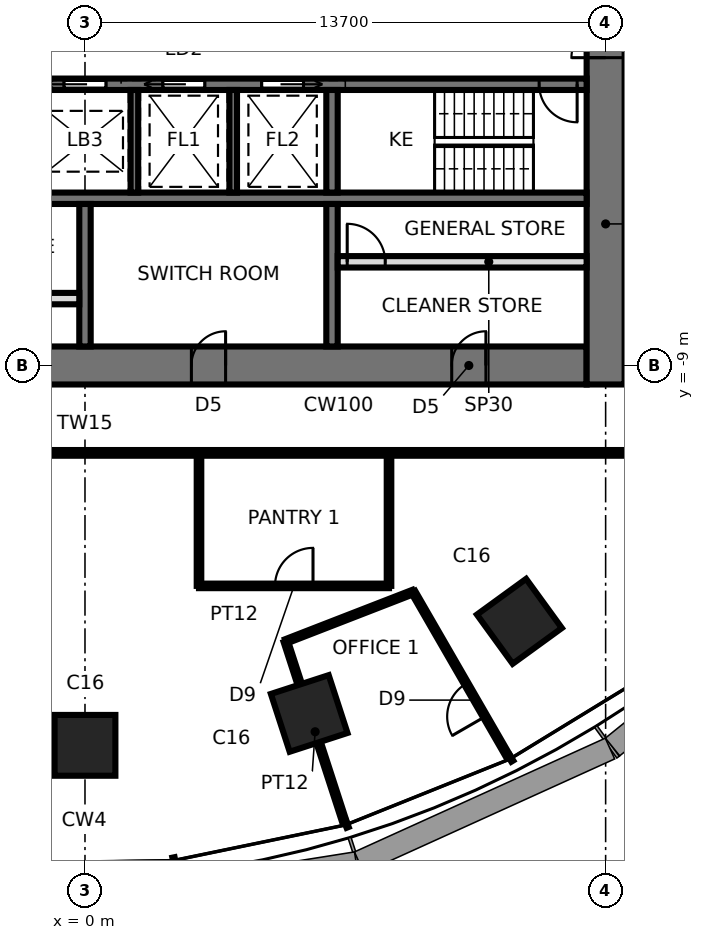
"""IFC4 building model, lengths in metres.
Left out: names, types, materials, properties, quantities, classifications, styles, units other than length and angle.
Written with IfcOpenShell. Run it as: python <this file> out.ifc"""

import sys

from ifc_helpers import new_model, si_unit, direction, frame, frame_2d, origin, origin_2d, place, context, subcontext, project, spatial, rectangle, extrude, element, fill, save


model = new_model("IFC4")
c1 = context("Model", 3, precision=1e-05, world=origin(), true_north=direction((0.0, 1.0)))
c2 = subcontext(c1, "Body", "Model", "MODEL_VIEW")
j1 = project(units=[si_unit("LENGTHUNIT", "METRE"), si_unit("PLANEANGLEUNIT", "RADIAN")], contexts=[c1])
p1 = place(None, origin())
s1 = spatial("IfcSite", under=j1, at=p1, CompositionType="ELEMENT")
p2 = place(p1, origin())
s2 = spatial("IfcBuilding", under=s1, at=p2, CompositionType="ELEMENT")
p3 = place(p2, frame((0.0, 0.0, 108.0)))
s3 = spatial("IfcBuildingStorey", under=s2, at=p3, CompositionType="ELEMENT", Elevation=108.0)
for number, where, z_axis, x_axis in (
    (1, (0.0, -18.996, 0.0), (0.0, 0.0, 1.0), (0.0, -1.0, 0.0)),
    (2, (5.9, -18.157, 0.0), (0.0, 0.0, 1.0), (0.309, -0.951, 0.0)),
    (3, (11.43, -15.733, 0.0), (0.0, 0.0, 1.0), (0.588, -0.809, 0.0)),
):
    element("IfcColumn", number, at=place(p3, frame(where, z_axis=z_axis, x_axis=x_axis)), inside=s3, PredefinedType="COLUMN", context=c2, shape_type="SweptSolid", body=[
        extrude(rectangle(XDim=1.6, YDim=1.6, at=origin_2d()), origin(), (0.0, 0.0, 1.0), 3.9),
    ])
p4 = place(p3, frame((-13.2, -9.0, 0.0), z_axis=(0.0, 0.0, 1.0), x_axis=(1.0, 0.0, 0.0)))
e4 = element("IfcWall", 4, at=p4, inside=s3, PredefinedType="SHEAR", context=c2, shape_type="SweptSolid", body=[
    extrude(rectangle(XDim=26.4, YDim=1.0, at=frame_2d((13.2, 0.0))), origin(), (0.0, 0.0, 1.0), 3.9),
])
p5 = place(p4, frame((2.65, 0.0, 0.0)))
e5 = element("IfcOpeningElement", 5, at=p5, cuts=e4, PredefinedType="OPENING", context=c2, shape_type="SweptSolid", body=[
    extrude(rectangle(XDim=0.9, YDim=2.1, at=frame_2d((0.45, 1.05))), frame((0.0, 0.51, 0.0), z_axis=(0.0, -1.0, 0.0), x_axis=(1.0, 0.0, 0.0)), (0.0, 0.0, 1.0), 1.02),
])
p6 = place(p4, frame((9.5, 0.0, 0.0)))
e6 = element("IfcOpeningElement", 6, at=p6, cuts=e4, PredefinedType="OPENING", context=c2, shape_type="SweptSolid", body=[
    extrude(rectangle(XDim=0.9, YDim=2.1, at=frame_2d((0.45, 1.05))), frame((0.0, 0.51, 0.0), z_axis=(0.0, -1.0, 0.0), x_axis=(1.0, 0.0, 0.0)), (0.0, 0.0, 1.0), 1.02),
])
p7 = place(p4, frame((16.0, 0.0, 0.0)))
e7 = element("IfcOpeningElement", 7, at=p7, cuts=e4, PredefinedType="OPENING", context=c2, shape_type="SweptSolid", body=[
    extrude(rectangle(XDim=0.9, YDim=2.1, at=frame_2d((0.45, 1.05))), frame((0.0, 0.51, 0.0), z_axis=(0.0, -1.0, 0.0), x_axis=(1.0, 0.0, 0.0)), (0.0, 0.0, 1.0), 1.02),
])
p8 = place(p4, frame((22.85, 0.0, 0.0)))
e8 = element("IfcOpeningElement", 8, at=p8, cuts=e4, PredefinedType="OPENING", context=c2, shape_type="SweptSolid", body=[
    extrude(rectangle(XDim=0.9, YDim=2.1, at=frame_2d((0.45, 1.05))), frame((0.0, 0.51, 0.0), z_axis=(0.0, -1.0, 0.0), x_axis=(1.0, 0.0, 0.0)), (0.0, 0.0, 1.0), 1.02),
])
p9 = place(p3, frame((13.7, -9.5, 0.0), z_axis=(0.0, 0.0, 1.0), x_axis=(0.0, 1.0, 0.0)))
e9 = element("IfcWall", 9, at=p9, inside=s3, PredefinedType="SHEAR", context=c2, shape_type="SweptSolid", body=[
    extrude(rectangle(XDim=19.0, YDim=1.0, at=frame_2d((9.5, 0.0))), origin(), (0.0, 0.0, 1.0), 3.9),
])
p10 = place(p9, frame((8.6, 0.0, 0.0)))
e10 = element("IfcOpeningElement", 10, at=p10, cuts=e9, PredefinedType="OPENING", context=c2, shape_type="SweptSolid", body=[
    extrude(rectangle(XDim=1.8, YDim=2.4, at=frame_2d((0.9, 1.2))), frame((0.0, 0.51, 0.0), z_axis=(0.0, -1.0, 0.0), x_axis=(1.0, 0.0, 0.0)), (0.0, 0.0, 1.0), 1.02),
])
p11 = place(p3, frame((-13.2, -1.6, 0.0), z_axis=(0.0, 0.0, 1.0), x_axis=(1.0, 0.0, 0.0)))
e11 = element("IfcWall", 11, at=p11, inside=s3, PredefinedType="SHEAR", context=c2, shape_type="SweptSolid", body=[
    extrude(rectangle(XDim=26.4, YDim=0.3, at=frame_2d((13.2, 0.0))), origin(), (0.0, 0.0, 1.0), 3.9),
])
p12 = place(p11, frame((25.15, 0.0, 0.0)))
e12 = element("IfcOpeningElement", 12, at=p12, cuts=e11, PredefinedType="OPENING", context=c2, shape_type="SweptSolid", body=[
    extrude(rectangle(XDim=1.0, YDim=2.1, at=frame_2d((0.5, 1.05))), frame((0.0, 0.16, 0.0), z_axis=(0.0, -1.0, 0.0), x_axis=(1.0, 0.0, 0.0)), (0.0, 0.0, 1.0), 0.32),
])
p13 = place(p11, frame((7.45, 0.0, 0.0)))
e13 = element("IfcOpeningElement", 13, at=p13, cuts=e11, PredefinedType="OPENING", context=c2, shape_type="SweptSolid", body=[
    extrude(rectangle(XDim=1.1, YDim=2.3, at=frame_2d((0.55, 1.15))), frame((0.0, 0.16, 0.0), z_axis=(0.0, -1.0, 0.0), x_axis=(1.0, 0.0, 0.0)), (0.0, 0.0, 1.0), 0.32),
])
p14 = place(p11, frame((10.05, 0.0, 0.0)))
e14 = element("IfcOpeningElement", 14, at=p14, cuts=e11, PredefinedType="OPENING", context=c2, shape_type="SweptSolid", body=[
    extrude(rectangle(XDim=1.1, YDim=2.3, at=frame_2d((0.55, 1.15))), frame((0.0, 0.16, 0.0), z_axis=(0.0, -1.0, 0.0), x_axis=(1.0, 0.0, 0.0)), (0.0, 0.0, 1.0), 0.32),
])
p15 = place(p11, frame((12.65, 0.0, 0.0)))
e15 = element("IfcOpeningElement", 15, at=p15, cuts=e11, PredefinedType="OPENING", context=c2, shape_type="SweptSolid", body=[
    extrude(rectangle(XDim=1.1, YDim=2.3, at=frame_2d((0.55, 1.15))), frame((0.0, 0.16, 0.0), z_axis=(0.0, -1.0, 0.0), x_axis=(1.0, 0.0, 0.0)), (0.0, 0.0, 1.0), 0.32),
])
p16 = place(p11, frame((15.25, 0.0, 0.0)))
e16 = element("IfcOpeningElement", 16, at=p16, cuts=e11, PredefinedType="OPENING", context=c2, shape_type="SweptSolid", body=[
    extrude(rectangle(XDim=1.1, YDim=2.3, at=frame_2d((0.55, 1.15))), frame((0.0, 0.16, 0.0), z_axis=(0.0, -1.0, 0.0), x_axis=(1.0, 0.0, 0.0)), (0.0, 0.0, 1.0), 0.32),
])
p17 = place(p11, frame((17.85, 0.0, 0.0)))
e17 = element("IfcOpeningElement", 17, at=p17, cuts=e11, PredefinedType="OPENING", context=c2, shape_type="SweptSolid", body=[
    extrude(rectangle(XDim=1.1, YDim=2.3, at=frame_2d((0.55, 1.15))), frame((0.0, 0.16, 0.0), z_axis=(0.0, -1.0, 0.0), x_axis=(1.0, 0.0, 0.0)), (0.0, 0.0, 1.0), 0.32),
])
p18 = place(p11, frame((5.55, 0.0, 0.0)))
e18 = element("IfcOpeningElement", 18, at=p18, cuts=e11, PredefinedType="OPENING", context=c2, shape_type="SweptSolid", body=[
    extrude(rectangle(XDim=0.9, YDim=2.1, at=frame_2d((0.45, 1.05))), frame((0.0, 0.16, 0.0), z_axis=(0.0, -1.0, 0.0), x_axis=(1.0, 0.0, 0.0)), (0.0, 0.0, 1.0), 0.32),
])
p19 = place(p3, frame((-13.2, -4.6, 0.0), z_axis=(0.0, 0.0, 1.0), x_axis=(1.0, 0.0, 0.0)))
e19 = element("IfcWall", 19, at=p19, inside=s3, PredefinedType="SHEAR", context=c2, shape_type="SweptSolid", body=[
    extrude(rectangle(XDim=26.4, YDim=0.3, at=frame_2d((13.2, 0.0))), origin(), (0.0, 0.0, 1.0), 3.9),
])
p20 = place(p3, frame((6.5, -1.75, 0.0), z_axis=(0.0, 0.0, 1.0), x_axis=(0.0, -1.0, 0.0)))
e20 = element("IfcWall", 20, at=p20, inside=s3, PredefinedType="SHEAR", context=c2, shape_type="SweptSolid", body=[
    extrude(rectangle(XDim=2.7, YDim=0.3, at=frame_2d((1.35, 0.0))), origin(), (0.0, 0.0, 1.0), 3.9),
])
p21 = place(p3, frame((6.5, -4.75, 0.0), z_axis=(0.0, 0.0, 1.0), x_axis=(0.0, -1.0, 0.0)))
e21 = element("IfcWall", 21, at=p21, inside=s3, PredefinedType="SHEAR", context=c2, shape_type="SweptSolid", body=[
    extrude(rectangle(XDim=3.75, YDim=0.3, at=frame_2d((1.875, 0.0))), origin(), (0.0, 0.0, 1.0), 3.9),
])
for number, where, z_axis, x_axis in (
    (22, (1.3, -1.75, 0.0), (0.0, 0.0, 1.0), (0.0, -1.0, 0.0)),
    (23, (3.9, -1.75, 0.0), (0.0, 0.0, 1.0), (0.0, -1.0, 0.0)),
):
    element("IfcWall", number, at=place(p3, frame(where, z_axis=z_axis, x_axis=x_axis)), inside=s3, PredefinedType="SHEAR", context=c2, shape_type="SweptSolid", body=[
        extrude(rectangle(XDim=2.7, YDim=0.2, at=frame_2d((1.35, 0.0))), origin(), (0.0, 0.0, 1.0), 3.9),
    ])
p22 = place(p3, frame((0.0, -4.75, 0.0), z_axis=(0.0, 0.0, 1.0), x_axis=(0.0, -1.0, 0.0)))
e24 = element("IfcWall", 24, at=p22, inside=s3, PredefinedType="SHEAR", context=c2, shape_type="SweptSolid", body=[
    extrude(rectangle(XDim=3.75, YDim=0.3, at=frame_2d((1.875, 0.0))), origin(), (0.0, 0.0, 1.0), 3.9),
])
p23 = place(p3, frame((-6.35, -7.24, 0.0), z_axis=(0.0, 0.0, 1.0), x_axis=(1.0, 0.0, 0.0)))
e25 = element("IfcWall", 25, at=p23, inside=s3, PredefinedType="PARTITIONING", context=c2, shape_type="SweptSolid", body=[
    extrude(rectangle(XDim=6.2, YDim=0.3, at=frame_2d((3.1, 0.0))), origin(), (0.0, 0.0, 1.0), 3.74),
])
p24 = place(p23, frame((0.25, 0.0, 0.0)))
e26 = element("IfcOpeningElement", 26, at=p24, cuts=e25, PredefinedType="OPENING", context=c2, shape_type="SweptSolid", body=[
    extrude(rectangle(XDim=1.0, YDim=2.4, at=frame_2d((0.5, 1.2))), frame((0.0, 0.16, 0.0), z_axis=(0.0, -1.0, 0.0), x_axis=(1.0, 0.0, 0.0)), (0.0, 0.0, 1.0), 0.32),
])
p25 = place(p3, frame((6.65, -6.272, 0.0), z_axis=(0.0, 0.0, 1.0), x_axis=(1.0, 0.0, 0.0)))
e27 = element("IfcWall", 27, at=p25, inside=s3, PredefinedType="PARTITIONING", context=c2, shape_type="SweptSolid", body=[
    extrude(rectangle(XDim=6.55, YDim=0.3, at=frame_2d((3.275, 0.0))), origin(), (0.0, 0.0, 1.0), 3.74),
])
p26 = place(p25, frame((0.25, 0.0, 0.0)))
e28 = element("IfcOpeningElement", 28, at=p26, cuts=e27, PredefinedType="OPENING", context=c2, shape_type="SweptSolid", body=[
    extrude(rectangle(XDim=1.0, YDim=2.4, at=frame_2d((0.5, 1.2))), frame((0.0, 0.16, 0.0), z_axis=(0.0, -1.0, 0.0), x_axis=(1.0, 0.0, 0.0)), (0.0, 0.0, 1.0), 0.32),
])
p27 = place(p3, frame((-16.0, -11.3, 0.0), z_axis=(0.0, 0.0, 1.0), x_axis=(1.0, 0.0, 0.0)))
e29 = element("IfcWall", 29, at=p27, inside=s3, PredefinedType="PARTITIONING", context=c2, shape_type="SweptSolid", body=[
    extrude(rectangle(XDim=32.0, YDim=0.15, at=frame_2d((16.0, 0.0))), origin(), (0.0, 0.0, 1.0), 3.74),
])
p28 = place(p3, frame((3.0, -11.3, 0.0), z_axis=(0.0, 0.0, 1.0), x_axis=(0.0, -1.0, 0.0)))
e30 = element("IfcWall", 30, at=p28, inside=s3, PredefinedType="PARTITIONING", context=c2, shape_type="SweptSolid", body=[
    extrude(rectangle(XDim=3.5, YDim=0.12, at=frame_2d((1.75, 0.0))), origin(), (0.0, 0.0, 1.0), 3.74),
])
p29 = place(p3, frame((5.283, -16.261, 0.0), z_axis=(0.0, 0.0, 1.0), x_axis=(0.309040803421, -0.951048779938, 0.0)))
e31 = element("IfcWall", 31, at=p29, inside=s3, PredefinedType="PARTITIONING", context=c2, shape_type="SweptSolid", body=[
    extrude(rectangle(XDim=5.0, YDim=0.12, at=frame_2d((2.5, 0.0))), origin(), (0.0, 0.0, 1.0), 2.94),
])
p30 = place(p3, frame((3.0, -14.8, 0.0), z_axis=(0.0, 0.0, 1.0), x_axis=(1.0, 0.0, 0.0)))
e32 = element("IfcWall", 32, at=p30, inside=s3, PredefinedType="PARTITIONING", context=c2, shape_type="SweptSolid", body=[
    extrude(rectangle(XDim=5.0, YDim=0.12, at=frame_2d((2.5, 0.0))), origin(), (0.0, 0.0, 1.0), 3.74),
])
p31 = place(p30, frame((2.0, 0.0, 0.0)))
e33 = element("IfcOpeningElement", 33, at=p31, cuts=e32, PredefinedType="OPENING", context=c2, shape_type="SweptSolid", body=[
    extrude(rectangle(XDim=1.0, YDim=2.4, at=frame_2d((0.5, 1.2))), frame((0.0, 0.07, 0.0), z_axis=(0.0, -1.0, 0.0), x_axis=(1.0, 0.0, 0.0)), (0.0, 0.0, 1.0), 0.14),
])
p32 = place(p3, frame((8.637, -14.959, 0.0), z_axis=(0.0, 0.0, 1.0), x_axis=(-0.932196869483, -0.361951649432, 0.0)))
e34 = element("IfcWall", 34, at=p32, inside=s3, PredefinedType="PARTITIONING", context=c2, shape_type="SweptSolid", body=[
    extrude(rectangle(XDim=3.597, YDim=0.12, at=frame_2d((1.799, 0.0))), origin(), (0.0, 0.0, 1.0), 3.74),
])
p33 = place(p3, frame((11.137, -19.289, 0.0), z_axis=(0.0, 0.0, 1.0), x_axis=(-0.499983091616, 0.866035165624, 0.0)))
e35 = element("IfcWall", 35, at=p33, inside=s3, PredefinedType="PARTITIONING", context=c2, shape_type="SweptSolid", body=[
    extrude(rectangle(XDim=5.0, YDim=0.12, at=frame_2d((2.5, 0.0))), origin(), (0.0, 0.0, 1.0), 3.74),
])
p34 = place(p33, frame((1.213, 0.0, 0.0)))
e36 = element("IfcOpeningElement", 36, at=p34, cuts=e35, PredefinedType="OPENING", context=c2, shape_type="SweptSolid", body=[
    extrude(rectangle(XDim=1.0, YDim=2.4, at=frame_2d((0.5, 1.2))), frame((0.0, 0.07, 0.0), z_axis=(0.0, -1.0, 0.0), x_axis=(1.0, 0.0, 0.0)), (0.0, 0.0, 1.0), 0.14),
])
p35 = place(p3, frame((8.0, -14.8, 0.0), z_axis=(0.0, 0.0, 1.0), x_axis=(0.0, 1.0, 0.0)))
e37 = element("IfcWall", 37, at=p35, inside=s3, PredefinedType="PARTITIONING", context=c2, shape_type="SweptSolid", body=[
    extrude(rectangle(XDim=3.5, YDim=0.12, at=frame_2d((1.75, 0.0))), origin(), (0.0, 0.0, 1.0), 3.74),
])
p36 = place(p10, origin())
e38 = element("IfcDoor", 38, at=p36, inside=s3, OperationType="DOUBLE_DOOR_SINGLE_SWING", PredefinedType="DOOR", context=c2, shape_type="SweptSolid", body=[
    extrude(rectangle(XDim=1.72, YDim=2.36, at=frame_2d((0.9, 1.18))), frame((0.0, 0.025, 0.0), z_axis=(0.0, -1.0, 0.0), x_axis=(1.0, 0.0, 0.0)), (0.0, 0.0, 1.0), 0.05),
    extrude(rectangle(XDim=0.04, YDim=2.4, at=frame_2d((0.02, 1.2))), frame((0.0, 0.25, 0.0), z_axis=(0.0, -1.0, 0.0), x_axis=(1.0, 0.0, 0.0)), (0.0, 0.0, 1.0), 0.5),
    extrude(rectangle(XDim=0.04, YDim=2.4, at=frame_2d((1.78, 1.2))), frame((0.0, 0.25, 0.0), z_axis=(0.0, -1.0, 0.0), x_axis=(1.0, 0.0, 0.0)), (0.0, 0.0, 1.0), 0.5),
    extrude(rectangle(XDim=1.72, YDim=0.04, at=frame_2d((0.9, 2.38))), frame((0.0, 0.25, 0.0), z_axis=(0.0, -1.0, 0.0), x_axis=(1.0, 0.0, 0.0)), (0.0, 0.0, 1.0), 0.5),
])
fill(e10, e38)
p37 = place(p12, frame((1.0, 0.0, 0.0), z_axis=(0.0, 0.0, 1.0), x_axis=(-1.0, 0.0, 0.0)))
e39 = element("IfcDoor", 39, at=p37, inside=s3, OperationType="SINGLE_SWING_LEFT", PredefinedType="DOOR", context=c2, shape_type="SweptSolid", body=[
    extrude(rectangle(XDim=1.0, YDim=2.1, at=frame_2d((0.5, 1.05))), frame((0.0, 0.025, 0.0), z_axis=(0.0, -1.0, 0.0), x_axis=(1.0, 0.0, 0.0)), (0.0, 0.0, 1.0), 0.05),
])
fill(e12, e39)
p38 = place(p15, frame((1.1, 0.0, 0.0), z_axis=(0.0, 0.0, 1.0), x_axis=(-1.0, 0.0, 0.0)))
e40 = element("IfcDoor", 40, at=p38, inside=s3, OperationType="SLIDING_TO_RIGHT", PredefinedType="DOOR", context=c2, shape_type="SweptSolid", body=[
    extrude(rectangle(XDim=1.1, YDim=2.3, at=frame_2d((0.55, 1.15))), frame((0.0, 0.025, 0.0), z_axis=(0.0, -1.0, 0.0), x_axis=(1.0, 0.0, 0.0)), (0.0, 0.0, 1.0), 0.05),
])
fill(e15, e40)
p39 = place(p16, frame((1.1, 0.0, 0.0), z_axis=(0.0, 0.0, 1.0), x_axis=(-1.0, 0.0, 0.0)))
e41 = element("IfcDoor", 41, at=p39, inside=s3, OperationType="SLIDING_TO_RIGHT", PredefinedType="DOOR", context=c2, shape_type="SweptSolid", body=[
    extrude(rectangle(XDim=1.1, YDim=2.3, at=frame_2d((0.55, 1.15))), frame((0.0, 0.025, 0.0), z_axis=(0.0, -1.0, 0.0), x_axis=(1.0, 0.0, 0.0)), (0.0, 0.0, 1.0), 0.05),
])
fill(e16, e41)
p40 = place(p17, frame((1.1, 0.0, 0.0), z_axis=(0.0, 0.0, 1.0), x_axis=(-1.0, 0.0, 0.0)))
e42 = element("IfcDoor", 42, at=p40, inside=s3, OperationType="SLIDING_TO_LEFT", PredefinedType="DOOR", context=c2, shape_type="SweptSolid", body=[
    extrude(rectangle(XDim=1.1, YDim=2.3, at=frame_2d((0.55, 1.15))), frame((0.0, 0.025, 0.0), z_axis=(0.0, -1.0, 0.0), x_axis=(1.0, 0.0, 0.0)), (0.0, 0.0, 1.0), 0.05),
])
fill(e17, e42)
p41 = place(p7, origin())
e43 = element("IfcDoor", 43, at=p41, inside=s3, OperationType="SINGLE_SWING_RIGHT", PredefinedType="DOOR", context=c2, shape_type="SweptSolid", body=[
    extrude(rectangle(XDim=0.82, YDim=2.06, at=frame_2d((0.45, 1.03))), frame((0.0, 0.025, 0.0), z_axis=(0.0, -1.0, 0.0), x_axis=(1.0, 0.0, 0.0)), (0.0, 0.0, 1.0), 0.05),
    extrude(rectangle(XDim=0.04, YDim=2.1, at=frame_2d((0.02, 1.05))), frame((0.0, 0.25, 0.0), z_axis=(0.0, -1.0, 0.0), x_axis=(1.0, 0.0, 0.0)), (0.0, 0.0, 1.0), 0.5),
    extrude(rectangle(XDim=0.04, YDim=2.1, at=frame_2d((0.88, 1.05))), frame((0.0, 0.25, 0.0), z_axis=(0.0, -1.0, 0.0), x_axis=(1.0, 0.0, 0.0)), (0.0, 0.0, 1.0), 0.5),
    extrude(rectangle(XDim=0.82, YDim=0.04, at=frame_2d((0.45, 2.08))), frame((0.0, 0.25, 0.0), z_axis=(0.0, -1.0, 0.0), x_axis=(1.0, 0.0, 0.0)), (0.0, 0.0, 1.0), 0.5),
])
fill(e7, e43)
p42 = place(p8, origin())
e44 = element("IfcDoor", 44, at=p42, inside=s3, OperationType="SINGLE_SWING_RIGHT", PredefinedType="DOOR", context=c2, shape_type="SweptSolid", body=[
    extrude(rectangle(XDim=0.82, YDim=2.06, at=frame_2d((0.45, 1.03))), frame((0.0, 0.025, 0.0), z_axis=(0.0, -1.0, 0.0), x_axis=(1.0, 0.0, 0.0)), (0.0, 0.0, 1.0), 0.05),
    extrude(rectangle(XDim=0.04, YDim=2.1, at=frame_2d((0.02, 1.05))), frame((0.0, 0.25, 0.0), z_axis=(0.0, -1.0, 0.0), x_axis=(1.0, 0.0, 0.0)), (0.0, 0.0, 1.0), 0.5),
    extrude(rectangle(XDim=0.04, YDim=2.1, at=frame_2d((0.88, 1.05))), frame((0.0, 0.25, 0.0), z_axis=(0.0, -1.0, 0.0), x_axis=(1.0, 0.0, 0.0)), (0.0, 0.0, 1.0), 0.5),
    extrude(rectangle(XDim=0.82, YDim=0.04, at=frame_2d((0.45, 2.08))), frame((0.0, 0.25, 0.0), z_axis=(0.0, -1.0, 0.0), x_axis=(1.0, 0.0, 0.0)), (0.0, 0.0, 1.0), 0.5),
])
fill(e8, e44)
p43 = place(p26, origin())
e45 = element("IfcDoor", 45, at=p43, inside=s3, OperationType="SINGLE_SWING_LEFT", PredefinedType="DOOR", context=c2, shape_type="SweptSolid", body=[
    extrude(rectangle(XDim=1.0, YDim=2.4, at=frame_2d((0.5, 1.2))), frame((0.0, 0.025, 0.0), z_axis=(0.0, -1.0, 0.0), x_axis=(1.0, 0.0, 0.0)), (0.0, 0.0, 1.0), 0.05),
])
fill(e28, e45)
p44 = place(p34, origin())
e46 = element("IfcDoor", 46, at=p44, inside=s3, OperationType="SINGLE_SWING_LEFT", PredefinedType="DOOR", context=c2, shape_type="SweptSolid", body=[
    extrude(rectangle(XDim=1.0, YDim=2.4, at=frame_2d((0.5, 1.2))), frame((0.0, 0.025, 0.0), z_axis=(0.0, -1.0, 0.0), x_axis=(1.0, 0.0, 0.0)), (0.0, 0.0, 1.0), 0.05),
])
fill(e36, e46)
p45 = place(p31, origin())
e47 = element("IfcDoor", 47, at=p45, inside=s3, OperationType="SINGLE_SWING_RIGHT", PredefinedType="DOOR", context=c2, shape_type="SweptSolid", body=[
    extrude(rectangle(XDim=1.0, YDim=2.4, at=frame_2d((0.5, 1.2))), frame((0.0, 0.025, 0.0), z_axis=(0.0, -1.0, 0.0), x_axis=(1.0, 0.0, 0.0)), (0.0, 0.0, 1.0), 0.05),
])
fill(e33, e47)
save(model, sys.argv[1])
